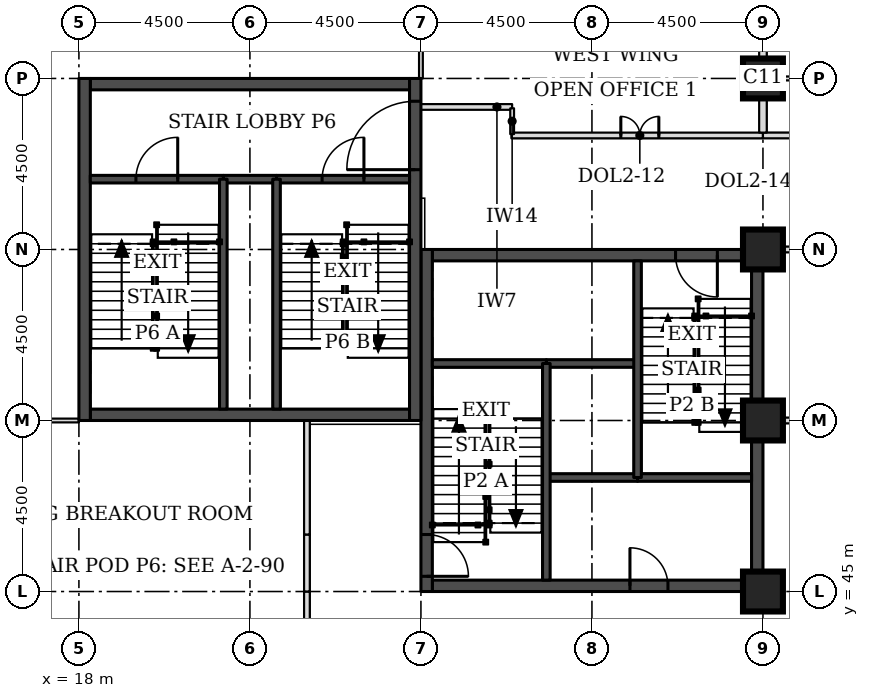
"""IFC4 building model, lengths in metres.
Left out: names, types, materials, properties, quantities, classifications, styles, units other than length and angle.
Written with IfcOpenShell. Run it as: python <this file> out.ifc"""

import sys

from ifc_helpers import new_model, si_unit, direction, frame, frame_2d, origin, origin_2d, place, context, subcontext, project, spatial, rectangle, extrude, element, fill, save


model = new_model("IFC4")
c1 = context("Model", 3, precision=1e-05, world=origin(), true_north=direction((0.0, 1.0)))
c2 = subcontext(c1, "Body", "Model", "MODEL_VIEW")
j1 = project(units=[si_unit("LENGTHUNIT", "METRE"), si_unit("PLANEANGLEUNIT", "RADIAN")], contexts=[c1])
p1 = place(None, origin())
s1 = spatial("IfcSite", under=j1, at=p1, CompositionType="ELEMENT")
p2 = place(p1, origin())
s2 = spatial("IfcBuilding", under=s1, at=p2, CompositionType="ELEMENT")
p3 = place(p2, frame((0.0, 0.0, 86.3)))
s3 = spatial("IfcBuildingStorey", under=s2, at=p3, CompositionType="ELEMENT", Elevation=86.3)
for number, where, z_axis, x_axis in (
    (1, (36.0, 45.0, 0.0), (0.0, 0.0, 1.0), (1.0, 0.0, 0.0)),
    (2, (36.0, 49.5, 0.0), (0.0, 0.0, 1.0), (1.0, 0.0, 0.0)),
    (3, (36.0, 54.0, 0.0), (0.0, 0.0, 1.0), (1.0, 0.0, 0.0)),
    (4, (36.0, 58.5, 0.0), (0.0, 0.0, 1.0), (1.0, 0.0, 0.0)),
):
    element("IfcColumn", number, at=place(p3, frame(where, z_axis=z_axis, x_axis=x_axis)), inside=s3, PredefinedType="COLUMN", context=c2, shape_type="SweptSolid", body=[
        extrude(rectangle(XDim=1.05, YDim=1.05, at=origin_2d()), origin(), (0.0, 0.0, 1.0), 3.7),
    ])
p4 = place(p3, frame((27.3, 45.15, 0.0), z_axis=(0.0, 0.0, 1.0), x_axis=(1.0, 0.0, 0.0)))
e5 = element("IfcWall", 5, at=p4, inside=s3, PredefinedType="SHEAR", context=c2, shape_type="SweptSolid", body=[
    extrude(rectangle(XDim=8.4, YDim=0.3, at=frame_2d((4.2, 0.0))), origin(), (0.0, 0.0, 1.0), 3.7),
])
p5 = place(p4, frame((5.2, 0.0, 0.0)))
e6 = element("IfcOpeningElement", 6, at=p5, cuts=e5, PredefinedType="OPENING", context=c2, shape_type="SweptSolid", body=[
    extrude(rectangle(XDim=1.0, YDim=2.1, at=frame_2d((0.5, 1.05))), frame((0.0, 0.16, 0.0), z_axis=(0.0, -1.0, 0.0), x_axis=(1.0, 0.0, 0.0)), (0.0, 0.0, 1.0), 0.32),
])
p6 = place(p3, frame((27.3, 53.85, 0.0), z_axis=(0.0, 0.0, 1.0), x_axis=(1.0, 0.0, 0.0)))
e7 = element("IfcWall", 7, at=p6, inside=s3, PredefinedType="SHEAR", context=c2, shape_type="SweptSolid", body=[
    extrude(rectangle(XDim=8.4, YDim=0.3, at=frame_2d((4.2, 0.0))), origin(), (0.0, 0.0, 1.0), 3.7),
])
p7 = place(p6, frame((6.4, 0.0, 0.0)))
e8 = element("IfcOpeningElement", 8, at=p7, cuts=e7, PredefinedType="OPENING", context=c2, shape_type="SweptSolid", body=[
    extrude(rectangle(XDim=1.1, YDim=2.1, at=frame_2d((0.55, 1.05))), frame((0.0, 0.16, 0.0), z_axis=(0.0, -1.0, 0.0), x_axis=(1.0, 0.0, 0.0)), (0.0, 0.0, 1.0), 0.32),
])
p8 = place(p3, frame((27.15, 45.0, 0.0), z_axis=(0.0, 0.0, 1.0), x_axis=(0.0, 1.0, 0.0)))
e9 = element("IfcWall", 9, at=p8, inside=s3, PredefinedType="SHEAR", context=c2, shape_type="SweptSolid", body=[
    extrude(rectangle(XDim=9.0, YDim=0.3, at=frame_2d((4.5, 0.0))), origin(), (0.0, 0.0, 1.0), 3.7),
])
p9 = place(p8, frame((0.4, 0.0, 0.0)))
e10 = element("IfcOpeningElement", 10, at=p9, cuts=e9, PredefinedType="OPENING", context=c2, shape_type="SweptSolid", body=[
    extrude(rectangle(XDim=1.1, YDim=2.1, at=frame_2d((0.55, 1.05))), frame((0.0, 0.16, 0.0), z_axis=(0.0, -1.0, 0.0), x_axis=(1.0, 0.0, 0.0)), (0.0, 0.0, 1.0), 0.32),
])
p10 = place(p3, frame((35.85, 45.0, 0.0), z_axis=(0.0, 0.0, 1.0), x_axis=(0.0, 1.0, 0.0)))
e11 = element("IfcWall", 11, at=p10, inside=s3, PredefinedType="SHEAR", context=c2, shape_type="SweptSolid", body=[
    extrude(rectangle(XDim=9.0, YDim=0.3, at=frame_2d((4.5, 0.0))), origin(), (0.0, 0.0, 1.0), 3.7),
])
for number, where, z_axis, x_axis in (
    (12, (18.3, 49.65, 0.0), (0.0, 0.0, 1.0), (1.0, 0.0, 0.0)),
    (13, (18.3, 58.35, 0.0), (0.0, 0.0, 1.0), (1.0, 0.0, 0.0)),
):
    element("IfcWall", number, at=place(p3, frame(where, z_axis=z_axis, x_axis=x_axis)), inside=s3, PredefinedType="SHEAR", context=c2, shape_type="SweptSolid", body=[
        extrude(rectangle(XDim=8.4, YDim=0.3, at=frame_2d((4.2, 0.0))), origin(), (0.0, 0.0, 1.0), 3.7),
    ])
p11 = place(p3, frame((18.15, 49.5, 0.0), z_axis=(0.0, 0.0, 1.0), x_axis=(0.0, 1.0, 0.0)))
e14 = element("IfcWall", 14, at=p11, inside=s3, PredefinedType="SHEAR", context=c2, shape_type="SweptSolid", body=[
    extrude(rectangle(XDim=9.0, YDim=0.3, at=frame_2d((4.5, 0.0))), origin(), (0.0, 0.0, 1.0), 3.7),
])
p12 = place(p3, frame((26.85, 49.5, 0.0), z_axis=(0.0, 0.0, 1.0), x_axis=(0.0, 1.0, 0.0)))
e15 = element("IfcWall", 15, at=p12, inside=s3, PredefinedType="SHEAR", context=c2, shape_type="SweptSolid", body=[
    extrude(rectangle(XDim=9.0, YDim=0.3, at=frame_2d((4.5, 0.0))), origin(), (0.0, 0.0, 1.0), 3.7),
])
p13 = place(p12, frame((6.6, 0.0, 0.0)))
e16 = element("IfcOpeningElement", 16, at=p13, cuts=e15, PredefinedType="OPENING", context=c2, shape_type="SweptSolid", body=[
    extrude(rectangle(XDim=1.8, YDim=2.1, at=frame_2d((0.9, 1.05))), frame((0.0, 0.16, 0.0), z_axis=(0.0, -1.0, 0.0), x_axis=(1.0, 0.0, 0.0)), (0.0, 0.0, 1.0), 0.32),
])
p14 = place(p3, frame((17.761, 63.751, 0.0), z_axis=(0.0, 0.0, 1.0), x_axis=(-0.707106781187, -0.707106781187, 0.0)))
e17 = element("IfcWall", 17, at=p14, inside=s3, PredefinedType="STANDARD", context=c2, shape_type="SweptSolid", body=[
    extrude(rectangle(XDim=7.089, YDim=0.35, at=frame_2d((3.544, 0.0))), origin(), (0.0, 0.0, 1.0), 3.525),
])
p15 = place(p14, frame((1.894, 0.0, 0.9)))
e18 = element("IfcOpeningElement", 18, at=p15, cuts=e17, PredefinedType="OPENING", context=c2, shape_type="SweptSolid", body=[
    extrude(rectangle(XDim=3.3, YDim=1.9, at=frame_2d((1.65, 0.95))), frame((0.0, 0.185, 0.0), z_axis=(0.0, -1.0, 0.0), x_axis=(1.0, 0.0, 0.0)), (0.0, 0.0, 1.0), 0.37),
])
p16 = place(p3, frame((12.749, 44.761, 0.0), z_axis=(0.0, 0.0, 1.0), x_axis=(0.707106781187, -0.707106781187, 0.0)))
e19 = element("IfcWall", 19, at=p16, inside=s3, PredefinedType="STANDARD", context=c2, shape_type="SweptSolid", body=[
    extrude(rectangle(XDim=7.089, YDim=0.35, at=frame_2d((3.544, 0.0))), origin(), (0.0, 0.0, 1.0), 3.525),
])
p17 = place(p16, frame((1.894, 0.0, 0.9)))
e20 = element("IfcOpeningElement", 20, at=p17, cuts=e19, PredefinedType="OPENING", context=c2, shape_type="SweptSolid", body=[
    extrude(rectangle(XDim=3.3, YDim=1.9, at=frame_2d((1.65, 0.95))), frame((0.0, 0.185, 0.0), z_axis=(0.0, -1.0, 0.0), x_axis=(1.0, 0.0, 0.0)), (0.0, 0.0, 1.0), 0.37),
])
for number, where, z_axis, x_axis in (
    (21, (36.525, 49.5, 0.0), (0.0, 0.0, 1.0), (1.0, 0.0, 0.0)),
    (22, (36.525, 54.0, 0.0), (0.0, 0.0, 1.0), (1.0, 0.0, 0.0)),
):
    element("IfcWall", number, at=place(p3, frame(where, z_axis=z_axis, x_axis=x_axis)), inside=s3, PredefinedType="PARTITIONING", context=c2, shape_type="SweptSolid", body=[
        extrude(rectangle(XDim=5.55, YDim=0.15, at=frame_2d((2.775, 0.0))), origin(), (0.0, 0.0, 1.0), 3.55),
    ])
p18 = place(p3, frame((29.38, 57.0, 0.0), z_axis=(0.0, 0.0, 1.0), x_axis=(1.0, 0.0, 0.0)))
e23 = element("IfcWall", 23, at=p18, inside=s3, PredefinedType="PARTITIONING", context=c2, shape_type="SweptSolid", body=[
    extrude(rectangle(XDim=6.62, YDim=0.15, at=frame_2d((3.31, 0.0))), origin(), (0.0, 0.0, 1.0), 3.55),
])
p19 = place(p18, frame((2.88, 0.0, 0.0)))
e24 = element("IfcOpeningElement", 24, at=p19, cuts=e23, PredefinedType="OPENING", context=c2, shape_type="SweptSolid", body=[
    extrude(rectangle(XDim=1.0, YDim=2.1, at=frame_2d((0.5, 1.05))), frame((0.0, 0.085, 0.0), z_axis=(0.0, -1.0, 0.0), x_axis=(1.0, 0.0, 0.0)), (0.0, 0.0, 1.0), 0.17),
])
p20 = place(p3, frame((36.0, 57.0, 0.0), z_axis=(0.0, 0.0, 1.0), x_axis=(1.0, 0.0, 0.0)))
e25 = element("IfcWall", 25, at=p20, inside=s3, PredefinedType="PARTITIONING", context=c2, shape_type="SweptSolid", body=[
    extrude(rectangle(XDim=6.075, YDim=0.15, at=frame_2d((3.038, 0.0))), origin(), (0.0, 0.0, 1.0), 3.55),
])
p21 = place(p20, frame((2.55, 0.0, 0.0)))
e26 = element("IfcOpeningElement", 26, at=p21, cuts=e25, PredefinedType="OPENING", context=c2, shape_type="SweptSolid", body=[
    extrude(rectangle(XDim=1.0, YDim=2.1, at=frame_2d((0.5, 1.05))), frame((0.0, 0.085, 0.0), z_axis=(0.0, -1.0, 0.0), x_axis=(1.0, 0.0, 0.0)), (0.0, 0.0, 1.0), 0.17),
])
p22 = place(p3, frame((36.525, 58.5, 0.0), z_axis=(0.0, 0.0, 1.0), x_axis=(1.0, 0.0, 0.0)))
e27 = element("IfcWall", 27, at=p22, inside=s3, PredefinedType="PARTITIONING", context=c2, shape_type="SweptSolid", body=[
    extrude(rectangle(XDim=2.525, YDim=0.1, at=frame_2d((1.263, 0.0))), origin(), (0.0, 0.0, 1.0), 3.55),
])
p23 = place(p22, frame((0.8, 0.0, 0.0)))
e28 = element("IfcOpeningElement", 28, at=p23, cuts=e27, PredefinedType="OPENING", context=c2, shape_type="SweptSolid", body=[
    extrude(rectangle(XDim=0.9, YDim=2.1, at=frame_2d((0.45, 1.05))), frame((0.0, 0.06, 0.0), z_axis=(0.0, -1.0, 0.0), x_axis=(1.0, 0.0, 0.0)), (0.0, 0.0, 1.0), 0.12),
])
p24 = place(p3, frame((24.0, 39.975, 0.0), z_axis=(0.0, 0.0, 1.0), x_axis=(0.0, 1.0, 0.0)))
e29 = element("IfcWall", 29, at=p24, inside=s3, PredefinedType="PARTITIONING", context=c2, shape_type="SweptSolid", body=[
    extrude(rectangle(XDim=5.025, YDim=0.15, at=frame_2d((2.512, 0.0))), origin(), (0.0, 0.0, 1.0), 3.55),
])
p25 = place(p3, frame((24.0, 45.0, 0.0), z_axis=(0.0, 0.0, 1.0), x_axis=(0.0, 1.0, 0.0)))
e30 = element("IfcWall", 30, at=p25, inside=s3, PredefinedType="PARTITIONING", context=c2, shape_type="SweptSolid", body=[
    extrude(rectangle(XDim=1.5, YDim=0.15, at=frame_2d((0.75, 0.0))), origin(), (0.0, 0.0, 1.0), 3.55),
])
p26 = place(p3, frame((24.0, 46.5, 0.0), z_axis=(0.0, 0.0, 1.0), x_axis=(0.0, 1.0, 0.0)))
e31 = element("IfcWall", 31, at=p26, inside=s3, PredefinedType="PARTITIONING", context=c2, shape_type="SweptSolid", body=[
    extrude(rectangle(XDim=3.0, YDim=0.15, at=frame_2d((1.5, 0.0))), origin(), (0.0, 0.0, 1.0), 3.55),
])
p27 = place(p3, frame((36.0, 57.075, 0.0), z_axis=(0.0, 0.0, 1.0), x_axis=(0.0, 1.0, 0.0)))
e32 = element("IfcWall", 32, at=p27, inside=s3, PredefinedType="PARTITIONING", context=c2, shape_type="SweptSolid", body=[
    extrude(rectangle(XDim=0.9, YDim=0.2, at=frame_2d((0.45, 0.0))), origin(), (0.0, 0.0, 1.0), 2.8),
])
p28 = place(p3, frame((36.0, 58.995, 0.0), z_axis=(0.0, 0.0, 1.0), x_axis=(0.0, 1.0, 0.0)))
e33 = element("IfcWall", 33, at=p28, inside=s3, PredefinedType="PARTITIONING", context=c2, shape_type="SweptSolid", body=[
    extrude(rectangle(XDim=1.005, YDim=0.2, at=frame_2d((0.502, 0.0))), origin(), (0.0, 0.0, 1.0), 2.8),
])
p29 = place(p3, frame((27.0, 63.0, 0.0), z_axis=(0.0, 0.0, 1.0), x_axis=(0.0, -1.0, 0.0)))
e34 = element("IfcWall", 34, at=p29, inside=s3, PredefinedType="PARTITIONING", context=c2, shape_type="SweptSolid", body=[
    extrude(rectangle(XDim=4.5, YDim=0.1, at=frame_2d((2.25, 0.0))), origin(), (0.0, 0.0, 1.0), 3.55),
])
p30 = place(p29, frame((1.8, 0.0, 0.0)))
e35 = element("IfcOpeningElement", 35, at=p30, cuts=e34, PredefinedType="OPENING", context=c2, shape_type="SweptSolid", body=[
    extrude(rectangle(XDim=0.9, YDim=2.1, at=frame_2d((0.45, 1.05))), frame((0.0, 0.06, 0.0), z_axis=(0.0, -1.0, 0.0), x_axis=(1.0, 0.0, 0.0)), (0.0, 0.0, 1.0), 0.12),
])
p31 = place(p3, frame((13.5, 49.5, 0.0), z_axis=(0.0, 0.0, 1.0), x_axis=(1.0, 0.0, 0.0)))
e36 = element("IfcWall", 36, at=p31, inside=s3, PredefinedType="PARTITIONING", context=c2, shape_type="SweptSolid", body=[
    extrude(rectangle(XDim=4.5, YDim=0.1, at=frame_2d((2.25, 0.0))), origin(), (0.0, 0.0, 1.0), 3.55),
])
p32 = place(p31, frame((1.8, 0.0, 0.0)))
e37 = element("IfcOpeningElement", 37, at=p32, cuts=e36, PredefinedType="OPENING", context=c2, shape_type="SweptSolid", body=[
    extrude(rectangle(XDim=0.9, YDim=2.1, at=frame_2d((0.45, 1.05))), frame((0.0, 0.06, 0.0), z_axis=(0.0, -1.0, 0.0), x_axis=(1.0, 0.0, 0.0)), (0.0, 0.0, 1.0), 0.12),
])
p33 = place(p3, frame((27.0, 57.75, 0.0), z_axis=(0.0, 0.0, 1.0), x_axis=(1.0, 0.0, 0.0)))
e38 = element("IfcWall", 38, at=p33, inside=s3, PredefinedType="PARTITIONING", context=c2, shape_type="SweptSolid", body=[
    extrude(rectangle(XDim=2.4, YDim=0.15, at=frame_2d((1.2, 0.0))), origin(), (0.0, 0.0, 1.0), 3.55),
])
p34 = place(p3, frame((29.4, 57.715, 0.0), z_axis=(0.0, 0.0, 1.0), x_axis=(0.0, -1.0, 0.0)))
e39 = element("IfcWall", 39, at=p34, inside=s3, PredefinedType="PARTITIONING", context=c2, shape_type="SweptSolid", body=[
    extrude(rectangle(XDim=0.68, YDim=0.1, at=frame_2d((0.34, 0.0))), origin(), (0.0, 0.0, 1.0), 3.55),
])
p35 = place(p3, frame((30.3, 48.0, 0.0), z_axis=(0.0, 0.0, 1.0), x_axis=(1.0, 0.0, 0.0)))
e40 = element("IfcWall", 40, at=p35, inside=s3, PredefinedType="SOLIDWALL", context=c2, shape_type="SweptSolid", body=[
    extrude(rectangle(XDim=2.4, YDim=0.2, at=frame_2d((1.2, 0.0))), origin(), (0.0, 0.0, 1.0), 3.55),
])
p36 = place(p3, frame((32.7, 48.0, 0.0), z_axis=(0.0, 0.0, 1.0), x_axis=(1.0, 0.0, 0.0)))
e41 = element("IfcWall", 41, at=p36, inside=s3, PredefinedType="SOLIDWALL", context=c2, shape_type="SweptSolid", body=[
    extrude(rectangle(XDim=3.0, YDim=0.2, at=frame_2d((1.5, 0.0))), origin(), (0.0, 0.0, 1.0), 3.55),
])
p37 = place(p3, frame((30.3, 51.0, 0.0), z_axis=(0.0, 0.0, 1.0), x_axis=(1.0, 0.0, 0.0)))
e42 = element("IfcWall", 42, at=p37, inside=s3, PredefinedType="SOLIDWALL", context=c2, shape_type="SweptSolid", body=[
    extrude(rectangle(XDim=2.4, YDim=0.2, at=frame_2d((1.2, 0.0))), origin(), (0.0, 0.0, 1.0), 3.7),
])
p38 = place(p3, frame((27.3, 51.0, 0.0), z_axis=(0.0, 0.0, 1.0), x_axis=(1.0, 0.0, 0.0)))
e43 = element("IfcWall", 43, at=p38, inside=s3, PredefinedType="SOLIDWALL", context=c2, shape_type="SweptSolid", body=[
    extrude(rectangle(XDim=3.0, YDim=0.2, at=frame_2d((1.5, 0.0))), origin(), (0.0, 0.0, 1.0), 3.55),
])
for number, where, z_axis, x_axis in (
    (44, (30.3, 45.3, 0.0), (0.0, 0.0, 1.0), (0.0, 1.0, 0.0)),
    (45, (32.7, 48.0, 0.0), (0.0, 0.0, 1.0), (0.0, 1.0, 0.0)),
):
    element("IfcWall", number, at=place(p3, frame(where, z_axis=z_axis, x_axis=x_axis)), inside=s3, PredefinedType="SOLIDWALL", context=c2, shape_type="SweptSolid", body=[
        extrude(rectangle(XDim=5.7, YDim=0.2, at=frame_2d((2.85, 0.0))), origin(), (0.0, 0.0, 1.0), 3.55),
    ])
p39 = place(p3, frame((21.8, 55.85, 0.0), z_axis=(0.0, 0.0, 1.0), x_axis=(1.0, 0.0, 0.0)))
e46 = element("IfcWall", 46, at=p39, inside=s3, PredefinedType="SOLIDWALL", context=c2, shape_type="SweptSolid", body=[
    extrude(rectangle(XDim=1.4, YDim=0.2, at=frame_2d((0.7, 0.0))), origin(), (0.0, 0.0, 1.0), 3.55),
])
p40 = place(p3, frame((18.3, 55.85, 0.0), z_axis=(0.0, 0.0, 1.0), x_axis=(1.0, 0.0, 0.0)))
e47 = element("IfcWall", 47, at=p40, inside=s3, PredefinedType="SOLIDWALL", context=c2, shape_type="SweptSolid", body=[
    extrude(rectangle(XDim=3.5, YDim=0.2, at=frame_2d((1.75, 0.0))), origin(), (0.0, 0.0, 1.0), 3.55),
])
p41 = place(p40, frame((1.2, 0.0, 0.0)))
e48 = element("IfcOpeningElement", 48, at=p41, cuts=e47, PredefinedType="OPENING", context=c2, shape_type="SweptSolid", body=[
    extrude(rectangle(XDim=1.1, YDim=2.1, at=frame_2d((0.55, 1.05))), frame((0.0, 0.11, 0.0), z_axis=(0.0, -1.0, 0.0), x_axis=(1.0, 0.0, 0.0)), (0.0, 0.0, 1.0), 0.22),
])
p42 = place(p3, frame((23.2, 55.85, 0.0), z_axis=(0.0, 0.0, 1.0), x_axis=(1.0, 0.0, 0.0)))
e49 = element("IfcWall", 49, at=p42, inside=s3, PredefinedType="SOLIDWALL", context=c2, shape_type="SweptSolid", body=[
    extrude(rectangle(XDim=3.5, YDim=0.2, at=frame_2d((1.75, 0.0))), origin(), (0.0, 0.0, 1.0), 3.55),
])
p43 = place(p42, frame((1.2, 0.0, 0.0)))
e50 = element("IfcOpeningElement", 50, at=p43, cuts=e49, PredefinedType="OPENING", context=c2, shape_type="SweptSolid", body=[
    extrude(rectangle(XDim=1.1, YDim=2.1, at=frame_2d((0.55, 1.05))), frame((0.0, 0.11, 0.0), z_axis=(0.0, -1.0, 0.0), x_axis=(1.0, 0.0, 0.0)), (0.0, 0.0, 1.0), 0.22),
])
for number, where, z_axis, x_axis in (
    (51, (21.8, 49.8, 0.0), (0.0, 0.0, 1.0), (0.0, 1.0, 0.0)),
    (52, (23.2, 49.8, 0.0), (0.0, 0.0, 1.0), (0.0, 1.0, 0.0)),
):
    element("IfcWall", number, at=place(p3, frame(where, z_axis=z_axis, x_axis=x_axis)), inside=s3, PredefinedType="SOLIDWALL", context=c2, shape_type="SweptSolid", body=[
        extrude(rectangle(XDim=6.05, YDim=0.2, at=frame_2d((3.025, 0.0))), origin(), (0.0, 0.0, 1.0), 3.55),
    ])
p44 = place(p19, origin())
e53 = element("IfcDoor", 53, at=p44, inside=s3, OperationType="DOUBLE_DOOR_SINGLE_SWING", PredefinedType="DOOR", context=c2, shape_type="SweptSolid", body=[
    extrude(rectangle(XDim=1.0, YDim=2.1, at=frame_2d((0.5, 1.05))), frame((0.0, 0.025, 0.0), z_axis=(0.0, -1.0, 0.0), x_axis=(1.0, 0.0, 0.0)), (0.0, 0.0, 1.0), 0.05),
])
fill(e24, e53)
p45 = place(p9, frame((1.1, 0.0, 0.0), z_axis=(0.0, 0.0, 1.0), x_axis=(-1.0, 0.0, 0.0)))
e54 = element("IfcDoor", 54, at=p45, inside=s3, OperationType="SINGLE_SWING_RIGHT", PredefinedType="DOOR", context=c2, shape_type="SweptSolid", body=[
    extrude(rectangle(XDim=1.1, YDim=2.1, at=frame_2d((0.55, 1.05))), frame((0.0, 0.025, 0.0), z_axis=(0.0, -1.0, 0.0), x_axis=(1.0, 0.0, 0.0)), (0.0, 0.0, 1.0), 0.05),
])
fill(e10, e54)
p46 = place(p7, frame((1.1, 0.0, 0.0), z_axis=(0.0, 0.0, 1.0), x_axis=(-1.0, 0.0, 0.0)))
e55 = element("IfcDoor", 55, at=p46, inside=s3, OperationType="SINGLE_SWING_LEFT", PredefinedType="DOOR", context=c2, shape_type="SweptSolid", body=[
    extrude(rectangle(XDim=1.1, YDim=2.1, at=frame_2d((0.55, 1.05))), frame((0.0, 0.025, 0.0), z_axis=(0.0, -1.0, 0.0), x_axis=(1.0, 0.0, 0.0)), (0.0, 0.0, 1.0), 0.05),
])
fill(e8, e55)
p47 = place(p5, origin())
e56 = element("IfcDoor", 56, at=p47, inside=s3, OperationType="SINGLE_SWING_LEFT", PredefinedType="DOOR", context=c2, shape_type="SweptSolid", body=[
    extrude(rectangle(XDim=1.0, YDim=2.1, at=frame_2d((0.5, 1.05))), frame((0.0, 0.025, 0.0), z_axis=(0.0, -1.0, 0.0), x_axis=(1.0, 0.0, 0.0)), (0.0, 0.0, 1.0), 0.05),
])
fill(e6, e56)
p48 = place(p41, origin())
e57 = element("IfcDoor", 57, at=p48, inside=s3, OperationType="SINGLE_SWING_RIGHT", PredefinedType="DOOR", context=c2, shape_type="SweptSolid", body=[
    extrude(rectangle(XDim=1.1, YDim=2.1, at=frame_2d((0.55, 1.05))), frame((0.0, 0.025, 0.0), z_axis=(0.0, -1.0, 0.0), x_axis=(1.0, 0.0, 0.0)), (0.0, 0.0, 1.0), 0.05),
])
fill(e48, e57)
p49 = place(p43, origin())
e58 = element("IfcDoor", 58, at=p49, inside=s3, OperationType="SINGLE_SWING_RIGHT", PredefinedType="DOOR", context=c2, shape_type="SweptSolid", body=[
    extrude(rectangle(XDim=1.1, YDim=2.1, at=frame_2d((0.55, 1.05))), frame((0.0, 0.025, 0.0), z_axis=(0.0, -1.0, 0.0), x_axis=(1.0, 0.0, 0.0)), (0.0, 0.0, 1.0), 0.05),
])
fill(e50, e58)
p50 = place(p13, origin())
e59 = element("IfcDoor", 59, at=p50, inside=s3, OperationType="SINGLE_SWING_LEFT", PredefinedType="DOOR", context=c2, shape_type="SweptSolid", body=[
    extrude(rectangle(XDim=1.8, YDim=2.1, at=frame_2d((0.9, 1.05))), frame((0.0, 0.025, 0.0), z_axis=(0.0, -1.0, 0.0), x_axis=(1.0, 0.0, 0.0)), (0.0, 0.0, 1.0), 0.05),
])
fill(e16, e59)
save(model, sys.argv[1])
